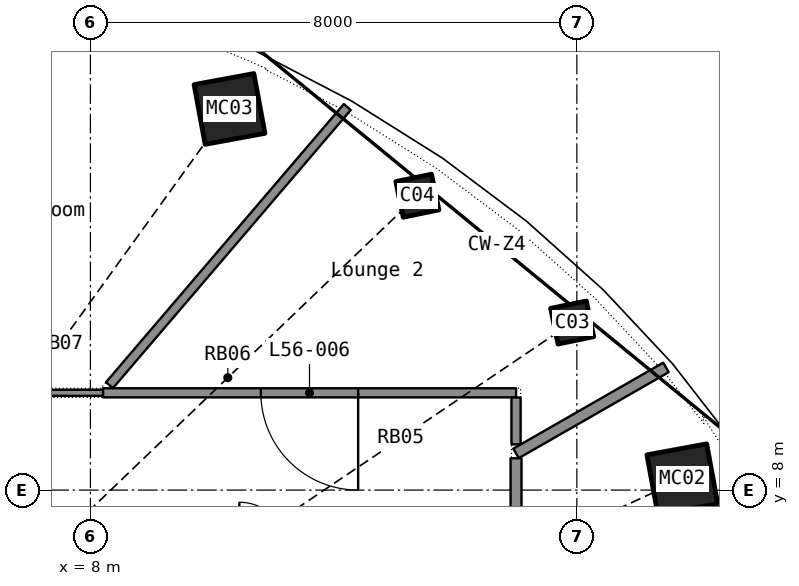
"""IFC4 building model, lengths in metres.
Left out: names, types, materials, properties, quantities, classifications, styles, units other than length and angle.
Written with IfcOpenShell. Run it as: python <this file> out.ifc"""

import sys

from ifc_helpers import new_model, si_unit, direction, frame, frame_2d, origin, origin_2d, place, context, subcontext, project, spatial, rectangle, hollow_rectangle, extrude, element, fill, save


model = new_model("IFC4")
c1 = context("Model", 3, precision=1e-05, world=origin(), true_north=direction((0.0, 1.0)))
c2 = subcontext(c1, "Body", "Model", "MODEL_VIEW")
j1 = project(units=[si_unit("LENGTHUNIT", "METRE"), si_unit("PLANEANGLEUNIT", "RADIAN")], contexts=[c1])
p1 = place(None, origin())
s1 = spatial("IfcSite", under=j1, at=p1, CompositionType="ELEMENT")
p2 = place(p1, origin())
s2 = spatial("IfcBuilding", under=s1, at=p2, CompositionType="ELEMENT")
p3 = place(p2, frame((0.0, 0.0, 231.9)))
s3 = spatial("IfcBuildingStorey", under=s2, at=p3, CompositionType="ELEMENT", Elevation=231.9)
p4 = place(p3, frame((17.734, 8.178, 0.0), z_axis=(-0.030004606, -0.014112057, 0.999450136), x_axis=(0.582174783, -0.813041543, 0.005997535)))
e1 = element("IfcColumn", 1, at=p4, inside=s3, PredefinedType="COLUMN", context=c2, shape_type="SweptSolid", body=[
    extrude(hollow_rectangle(XDim=1.0, YDim=1.0, WallThickness=0.032, at=origin_2d()), origin(), (0.0, 0.0, 1.0), 3.702),
])
p5 = place(p3, frame((15.923, 10.756, 0.0), z_axis=(-0.026510431, -0.018201192, 0.999482823), x_axis=(0.720757976, -0.693156374, 0.006494692)))
e2 = element("IfcColumn", 2, at=p5, inside=s3, PredefinedType="COLUMN", context=c2, shape_type="SweptSolid", body=[
    extrude(hollow_rectangle(XDim=0.6, YDim=0.6, WallThickness=0.025, at=origin_2d()), origin(), (0.0, 0.0, 1.0), 3.702),
])
p6 = place(p3, frame((13.377, 12.842, 0.0), z_axis=(-0.02222469, -0.021697101, 0.999517533), x_axis=(0.82878027, -0.559538918, 0.006282043)))
e3 = element("IfcColumn", 3, at=p6, inside=s3, PredefinedType="COLUMN", context=c2, shape_type="SweptSolid", body=[
    extrude(hollow_rectangle(XDim=0.6, YDim=0.6, WallThickness=0.025, at=origin_2d()), origin(), (0.0, 0.0, 1.0), 3.702),
])
p7 = place(p3, frame((10.288, 14.269, 0.0), z_axis=(-0.01727907, -0.024599592, 0.999548045), x_axis=(0.909169242, -0.416390896, 0.005469025)))
e4 = element("IfcColumn", 4, at=p7, inside=s3, PredefinedType="COLUMN", context=c2, shape_type="SweptSolid", body=[
    extrude(hollow_rectangle(XDim=1.0, YDim=1.0, WallThickness=0.032, at=origin_2d()), origin(), (0.0, 0.0, 1.0), 3.702),
])
p8 = place(p3, frame((15.0, 9.6, 0.0), z_axis=(0.0, 0.0, 1.0), x_axis=(-1.0, 0.0, 0.0)))
e5 = element("IfcWall", 5, at=p8, inside=s3, PredefinedType="PARTITIONING", context=c2, shape_type="SweptSolid", body=[
    extrude(rectangle(XDim=6.793, YDim=0.15, at=frame_2d((3.397, 0.0))), origin(), (0.0, 0.0, 1.0), 2.4),
])
p9 = place(p8, frame((2.597, 0.0, 0.0)))
e6 = element("IfcOpeningElement", 6, at=p9, cuts=e5, PredefinedType="OPENING", context=c2, shape_type="SweptSolid", body=[
    extrude(rectangle(XDim=1.6, YDim=2.4, at=frame_2d((0.8, 1.2))), frame((0.0, 0.085, 0.0), z_axis=(0.0, -1.0, 0.0), x_axis=(1.0, 0.0, 0.0)), (0.0, 0.0, 1.0), 0.17),
])
p10 = place(p3, frame((12.224, 14.3, 0.0), z_axis=(0.0, 0.0, 1.0), x_axis=(-0.649785307, -0.76011779, 0.0)))
e7 = element("IfcWall", 7, at=p10, inside=s3, PredefinedType="PARTITIONING", context=c2, shape_type="SweptSolid", body=[
    extrude(rectangle(XDim=6.019, YDim=0.15, at=frame_2d((3.009, 0.0))), origin(), (0.0, 0.0, 1.0), 2.4),
])
p11 = place(p3, frame((8.207, 9.6, 0.0), z_axis=(0.0, 0.0, 1.0), x_axis=(-1.0, 0.0, 0.0)))
e8 = element("IfcWall", 8, at=p11, inside=s3, PredefinedType="PARTITIONING", context=c2, shape_type="SweptSolid", body=[
    extrude(rectangle(XDim=4.969, YDim=0.1, at=frame_2d((2.484, 0.0))), origin(), (0.0, 0.0, 1.0), 2.4),
])
p12 = place(p11, frame((1.734, 0.0, 0.0)))
e9 = element("IfcOpeningElement", 9, at=p12, cuts=e8, PredefinedType="OPENING", context=c2, shape_type="SweptSolid", body=[
    extrude(rectangle(XDim=1.5, YDim=2.4, at=frame_2d((0.75, 1.2))), frame((0.0, 0.06, 0.0), z_axis=(0.0, -1.0, 0.0), x_axis=(1.0, 0.0, 0.0)), (0.0, 0.0, 1.0), 0.12),
])
p13 = place(p3, frame((17.466, 10.017, 0.0), z_axis=(0.0, 0.0, 1.0), x_axis=(-0.867459752, -0.497507365, 0.0)))
e10 = element("IfcWall", 10, at=p13, inside=s3, PredefinedType="PARTITIONING", context=c2, shape_type="SweptSolid", body=[
    extrude(rectangle(XDim=2.842, YDim=0.18, at=frame_2d((1.421, 0.0))), origin(), (0.0, 0.0, 1.0), 2.4),
])
p14 = place(p3, frame((15.0, 7.213, 0.0), z_axis=(0.0, 0.0, 1.0), x_axis=(0.0, 1.0, 0.0)))
e11 = element("IfcWall", 11, at=p14, inside=s3, PredefinedType="PARTITIONING", context=c2, shape_type="SweptSolid", body=[
    extrude(rectangle(XDim=1.31, YDim=0.18, at=frame_2d((0.655, 0.0))), origin(), (0.0, 0.0, 1.0), 2.4),
])
p15 = place(p3, frame((15.0, 8.752, 0.0), z_axis=(0.0, 0.0, 1.0), x_axis=(0.0, 1.0, 0.0)))
e12 = element("IfcWall", 12, at=p15, inside=s3, PredefinedType="PARTITIONING", context=c2, shape_type="SweptSolid", body=[
    extrude(rectangle(XDim=0.771, YDim=0.15, at=frame_2d((0.385, 0.0))), origin(), (0.0, 0.0, 1.0), 2.4),
])
p16 = place(p9, origin())
e13 = element("IfcDoor", 13, at=p16, inside=s3, OperationType="DOUBLE_DOOR_SINGLE_SWING", PredefinedType="DOOR", context=c2, shape_type="SweptSolid", body=[
    extrude(rectangle(XDim=1.6, YDim=2.4, at=frame_2d((0.8, 1.2))), frame((0.0, 0.025, 0.0), z_axis=(0.0, -1.0, 0.0), x_axis=(1.0, 0.0, 0.0)), (0.0, 0.0, 1.0), 0.05),
])
fill(e6, e13)
save(model, sys.argv[1])
